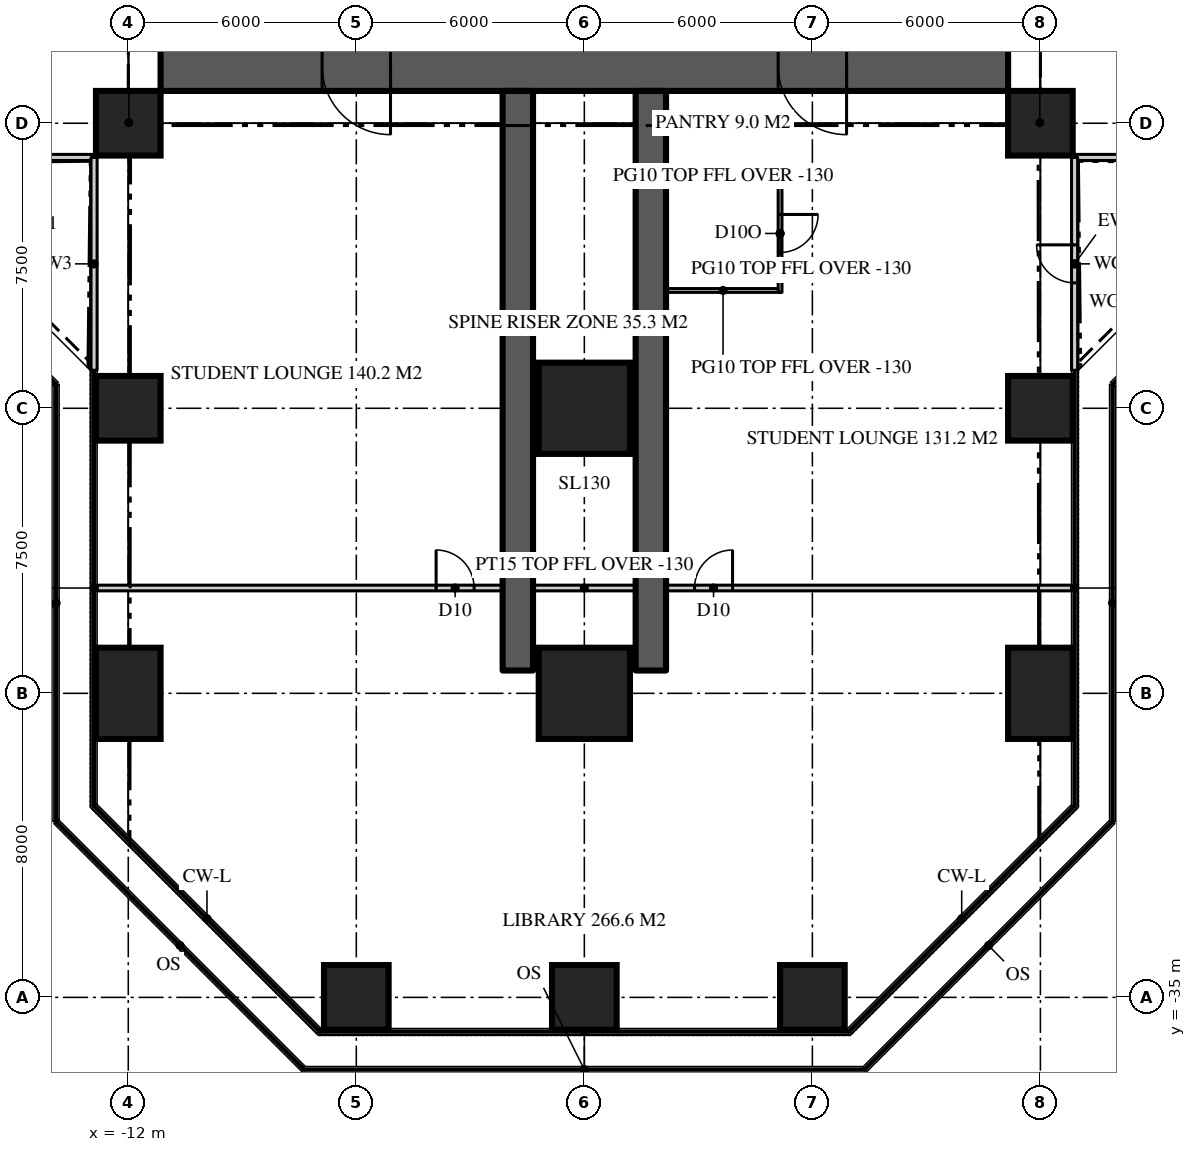
"""IFC4 building model, lengths in metres.
Left out: names, types, materials, properties, quantities, classifications, styles, units other than length and angle.
Written with IfcOpenShell. Run it as: python <this file> out.ifc"""

import sys

from ifc_helpers import new_model, si_unit, direction, frame, frame_2d, origin, origin_2d, place, context, subcontext, project, spatial, rectangle, extrude, element, fill, save


model = new_model("IFC4")
c1 = context("Model", 3, precision=1e-05, world=origin(), true_north=direction((0.0, 1.0)))
c2 = subcontext(c1, "Body", "Model", "MODEL_VIEW")
j1 = project(units=[si_unit("LENGTHUNIT", "METRE"), si_unit("PLANEANGLEUNIT", "RADIAN")], contexts=[c1])
p1 = place(None, origin())
s1 = spatial("IfcSite", under=j1, at=p1, CompositionType="ELEMENT")
p2 = place(p1, origin())
s2 = spatial("IfcBuilding", under=s1, at=p2, CompositionType="ELEMENT")
p3 = place(p2, frame((0.0, 0.0, 109.8)))
s3 = spatial("IfcBuildingStorey", under=s2, at=p3, CompositionType="ELEMENT", Elevation=109.8)
p4 = place(p3, frame((11.15, -10.5, 0.0), z_axis=(0.0, 0.0, 1.0), x_axis=(-1.0, 0.0, 0.0)))
e1 = element("IfcWall", 1, at=p4, inside=s3, PredefinedType="SHEAR", context=c2, shape_type="SweptSolid", body=[
    extrude(rectangle(XDim=22.3, YDim=1.3, at=frame_2d((11.15, 0.0))), origin(), (0.0, 0.0, 1.0), 3.9),
])
p5 = place(p4, frame((16.25, 0.0, 0.0)))
e2 = element("IfcOpeningElement", 2, at=p5, cuts=e1, PredefinedType="OPENING", context=c2, shape_type="SweptSolid", body=[
    extrude(rectangle(XDim=1.8, YDim=2.2, at=frame_2d((0.9, 1.1))), frame((0.0, 0.66, 0.0), z_axis=(0.0, -1.0, 0.0), x_axis=(1.0, 0.0, 0.0)), (0.0, 0.0, 1.0), 1.32),
])
p6 = place(p4, frame((4.25, 0.0, 0.0)))
e3 = element("IfcOpeningElement", 3, at=p6, cuts=e1, PredefinedType="OPENING", context=c2, shape_type="SweptSolid", body=[
    extrude(rectangle(XDim=1.8, YDim=2.2, at=frame_2d((0.9, 1.1))), frame((0.0, 0.66, 0.0), z_axis=(0.0, -1.0, 0.0), x_axis=(1.0, 0.0, 0.0)), (0.0, 0.0, 1.0), 1.32),
])
for number, where, z_axis, x_axis in (
    (4, (-1.75, -11.15, 0.0), (0.0, 0.0, 1.0), (0.0, -1.0, 0.0)),
    (5, (1.75, -11.15, 0.0), (0.0, 0.0, 1.0), (0.0, -1.0, 0.0)),
):
    element("IfcWall", number, at=place(p3, frame(where, z_axis=z_axis, x_axis=x_axis)), inside=s3, PredefinedType="SHEAR", context=c2, shape_type="SweptSolid", body=[
        extrude(rectangle(XDim=15.25, YDim=0.8, at=frame_2d((7.625, 0.0))), origin(), (0.0, 0.0, 1.0), 3.9),
    ])
for number, where, z_axis, x_axis in (
    (6, (-6.0, -35.0, 0.0), (0.0, 0.0, 1.0), (1.0, 0.0, 0.0)),
    (7, (0.0, -35.0, 0.0), (0.0, 0.0, 1.0), (1.0, 0.0, 0.0)),
    (8, (6.0, -35.0, 0.0), (0.0, 0.0, 1.0), (1.0, 0.0, 0.0)),
):
    element("IfcColumn", number, at=place(p3, frame(where, z_axis=z_axis, x_axis=x_axis)), inside=s3, PredefinedType="COLUMN", context=c2, shape_type="SweptSolid", body=[
        extrude(rectangle(XDim=1.7, YDim=1.7, at=origin_2d()), origin(), (0.0, 0.0, 1.0), 3.9),
    ])
p7 = place(p3, frame((-12.0, -27.0, 0.0), z_axis=(0.0, 0.0, 1.0), x_axis=(1.0, 0.0, 0.0)))
e9 = element("IfcColumn", 9, at=p7, inside=s3, PredefinedType="COLUMN", context=c2, shape_type="SweptSolid", body=[
    extrude(rectangle(XDim=1.7, YDim=2.4, at=origin_2d()), origin(), (0.0, 0.0, 1.0), 3.9),
])
p8 = place(p3, frame((0.0, -27.0, 0.0), z_axis=(0.0, 0.0, 1.0), x_axis=(1.0, 0.0, 0.0)))
e10 = element("IfcColumn", 10, at=p8, inside=s3, PredefinedType="COLUMN", context=c2, shape_type="SweptSolid", body=[
    extrude(rectangle(XDim=2.4, YDim=2.4, at=origin_2d()), origin(), (0.0, 0.0, 1.0), 3.9),
])
p9 = place(p3, frame((12.0, -27.0, 0.0), z_axis=(0.0, 0.0, 1.0), x_axis=(1.0, 0.0, 0.0)))
e11 = element("IfcColumn", 11, at=p9, inside=s3, PredefinedType="COLUMN", context=c2, shape_type="SweptSolid", body=[
    extrude(rectangle(XDim=1.7, YDim=2.4, at=origin_2d()), origin(), (0.0, 0.0, 1.0), 3.9),
])
p10 = place(p3, frame((-12.0, -19.5, 0.0), z_axis=(0.0, 0.0, 1.0), x_axis=(1.0, 0.0, 0.0)))
e12 = element("IfcColumn", 12, at=p10, inside=s3, PredefinedType="COLUMN", context=c2, shape_type="SweptSolid", body=[
    extrude(rectangle(XDim=1.7, YDim=1.7, at=origin_2d()), origin(), (0.0, 0.0, 1.0), 3.9),
])
p11 = place(p3, frame((0.0, -19.5, 0.0), z_axis=(0.0, 0.0, 1.0), x_axis=(1.0, 0.0, 0.0)))
e13 = element("IfcColumn", 13, at=p11, inside=s3, PredefinedType="COLUMN", context=c2, shape_type="SweptSolid", body=[
    extrude(rectangle(XDim=2.4, YDim=2.4, at=origin_2d()), origin(), (0.0, 0.0, 1.0), 3.9),
])
for number, where, z_axis, x_axis in (
    (14, (12.0, -19.5, 0.0), (0.0, 0.0, 1.0), (1.0, 0.0, 0.0)),
    (15, (-12.0, -12.0, 0.0), (0.0, 0.0, 1.0), (1.0, 0.0, 0.0)),
    (16, (12.0, -12.0, 0.0), (0.0, 0.0, 1.0), (1.0, 0.0, 0.0)),
):
    element("IfcColumn", number, at=place(p3, frame(where, z_axis=z_axis, x_axis=x_axis)), inside=s3, PredefinedType="COLUMN", context=c2, shape_type="SweptSolid", body=[
        extrude(rectangle(XDim=1.7, YDim=1.7, at=origin_2d()), origin(), (0.0, 0.0, 1.0), 3.9),
    ])
p12 = place(p3, frame((12.9, -12.9, 0.0), z_axis=(0.0, 0.0, 1.0), x_axis=(1.0, 0.0, 0.0)))
e17 = element("IfcWall", 17, at=p12, inside=s3, PredefinedType="SOLIDWALL", context=c2, shape_type="SweptSolid", body=[
    extrude(rectangle(XDim=5.6, YDim=0.16, at=frame_2d((2.8, 0.0))), origin(), (0.0, 0.0, 1.0), 3.77),
])
p13 = place(p3, frame((-18.5, -12.9, 0.0), z_axis=(0.0, 0.0, 1.0), x_axis=(1.0, 0.0, 0.0)))
e18 = element("IfcWall", 18, at=p13, inside=s3, PredefinedType="SOLIDWALL", context=c2, shape_type="SweptSolid", body=[
    extrude(rectangle(XDim=5.6, YDim=0.16, at=frame_2d((2.8, 0.0))), origin(), (0.0, 0.0, 1.0), 3.77),
])
p14 = place(p13, frame((2.3, 0.0, 0.0)))
e19 = element("IfcOpeningElement", 19, at=p14, cuts=e18, PredefinedType="OPENING", context=c2, shape_type="SweptSolid", body=[
    extrude(rectangle(XDim=1.0, YDim=2.2, at=frame_2d((0.5, 1.1))), frame((0.0, 0.09, 0.0), z_axis=(0.0, -1.0, 0.0), x_axis=(1.0, 0.0, 0.0)), (0.0, 0.0, 1.0), 0.18),
])
p15 = place(p3, frame((-12.9, -12.9, 0.0), z_axis=(0.0, 0.0, 1.0), x_axis=(0.0, -1.0, 0.0)))
e20 = element("IfcWall", 20, at=p15, inside=s3, PredefinedType="SOLIDWALL", context=c2, shape_type="SweptSolid", body=[
    extrude(rectangle(XDim=5.6, YDim=0.16, at=frame_2d((2.8, 0.0))), origin(), (0.0, 0.0, 1.0), 3.77),
])
p16 = place(p3, frame((12.9, -18.5, 0.0), z_axis=(0.0, 0.0, 1.0), x_axis=(0.0, 1.0, 0.0)))
e21 = element("IfcWall", 21, at=p16, inside=s3, PredefinedType="SOLIDWALL", context=c2, shape_type="SweptSolid", body=[
    extrude(rectangle(XDim=5.6, YDim=0.16, at=frame_2d((2.8, 0.0))), origin(), (0.0, 0.0, 1.0), 3.77),
])
p17 = place(p16, frame((2.3, 0.0, 0.0)))
e22 = element("IfcOpeningElement", 22, at=p17, cuts=e21, PredefinedType="OPENING", context=c2, shape_type="SweptSolid", body=[
    extrude(rectangle(XDim=1.0, YDim=2.2, at=frame_2d((0.5, 1.1))), frame((0.0, 0.09, 0.0), z_axis=(0.0, -1.0, 0.0), x_axis=(1.0, 0.0, 0.0)), (0.0, 0.0, 1.0), 0.18),
])
p18 = place(p3, frame((-12.82, -24.229, 0.0), z_axis=(0.0, 0.0, 1.0), x_axis=(1.0, 0.0, 0.0)))
e23 = element("IfcWall", 23, at=p18, inside=s3, PredefinedType="PARTITIONING", context=c2, shape_type="SweptSolid", body=[
    extrude(rectangle(XDim=25.64, YDim=0.15, at=frame_2d((12.82, 0.0))), origin(), (0.0, 0.0, 1.0), 3.77),
])
p19 = place(p18, frame((15.72, 0.0, 0.0)))
e24 = element("IfcOpeningElement", 24, at=p19, cuts=e23, PredefinedType="OPENING", context=c2, shape_type="SweptSolid", body=[
    extrude(rectangle(XDim=1.0, YDim=2.2, at=frame_2d((0.5, 1.1))), frame((0.0, 0.085, 0.0), z_axis=(0.0, -1.0, 0.0), x_axis=(1.0, 0.0, 0.0)), (0.0, 0.0, 1.0), 0.17),
])
p20 = place(p18, frame((8.92, 0.0, 0.0)))
e25 = element("IfcOpeningElement", 25, at=p20, cuts=e23, PredefinedType="OPENING", context=c2, shape_type="SweptSolid", body=[
    extrude(rectangle(XDim=1.0, YDim=2.2, at=frame_2d((0.5, 1.1))), frame((0.0, 0.085, 0.0), z_axis=(0.0, -1.0, 0.0), x_axis=(1.0, 0.0, 0.0)), (0.0, 0.0, 1.0), 0.17),
])
for number, where, z_axis, x_axis in (
    (26, (2.15, -13.4, 0.0), (0.0, 0.0, 1.0), (1.0, 0.0, 0.0)),
    (27, (2.15, -16.4, 0.0), (0.0, 0.0, 1.0), (1.0, 0.0, 0.0)),
):
    element("IfcWall", number, at=place(p3, frame(where, z_axis=z_axis, x_axis=x_axis)), inside=s3, PredefinedType="PARTITIONING", context=c2, shape_type="SweptSolid", body=[
        extrude(rectangle(XDim=3.0, YDim=0.1, at=frame_2d((1.5, 0.0))), origin(), (0.0, 0.0, 1.0), 3.77),
    ])
p21 = place(p3, frame((5.15, -13.35, 0.0), z_axis=(0.0, 0.0, 1.0), x_axis=(0.0, -1.0, 0.0)))
e28 = element("IfcWall", 28, at=p21, inside=s3, PredefinedType="PARTITIONING", context=c2, shape_type="SweptSolid", body=[
    extrude(rectangle(XDim=3.1, YDim=0.1, at=frame_2d((1.55, 0.0))), origin(), (0.0, 0.0, 1.0), 3.77),
])
p22 = place(p21, frame((1.05, 0.0, 0.0)))
e29 = element("IfcOpeningElement", 29, at=p22, cuts=e28, PredefinedType="OPENING", context=c2, shape_type="SweptSolid", body=[
    extrude(rectangle(XDim=1.0, YDim=2.2, at=frame_2d((0.5, 1.1))), frame((0.0, 0.06, 0.0), z_axis=(0.0, -1.0, 0.0), x_axis=(1.0, 0.0, 0.0)), (0.0, 0.0, 1.0), 0.12),
])
for number, where, z_axis, x_axis in (
    (30, (-11.15, -11.15, 0.0), (0.0, 0.0, 1.0), (-0.707, -0.707, 0.0)),
    (31, (11.15, -11.15, 0.0), (0.0, 0.0, 1.0), (0.707, -0.707, 0.0)),
):
    element("IfcWall", number, at=place(p3, frame(where, z_axis=z_axis, x_axis=x_axis)), inside=s3, PredefinedType="PARTITIONING", context=c2, shape_type="SweptSolid", body=[
        extrude(rectangle(XDim=2.362, YDim=0.15, at=frame_2d((1.181, 0.0))), origin(), (0.0, 0.0, 1.0), 3.77),
    ])
p23 = place(p17, origin())
e32 = element("IfcDoor", 32, at=p23, inside=s3, OperationType="SINGLE_SWING_RIGHT", PredefinedType="DOOR", context=c2, shape_type="SweptSolid", body=[
    extrude(rectangle(XDim=1.0, YDim=2.2, at=frame_2d((0.5, 1.1))), frame((0.0, 0.025, 0.0), z_axis=(0.0, -1.0, 0.0), x_axis=(1.0, 0.0, 0.0)), (0.0, 0.0, 1.0), 0.05),
])
fill(e22, e32)
p24 = place(p5, origin())
e33 = element("IfcDoor", 33, at=p24, inside=s3, OperationType="DOUBLE_DOOR_DOUBLE_SWING", PredefinedType="DOOR", context=c2, shape_type="SweptSolid", body=[
    extrude(rectangle(XDim=1.8, YDim=2.2, at=frame_2d((0.9, 1.1))), frame((0.0, 0.025, 0.0), z_axis=(0.0, -1.0, 0.0), x_axis=(1.0, 0.0, 0.0)), (0.0, 0.0, 1.0), 0.05),
])
fill(e2, e33)
p25 = place(p6, origin())
e34 = element("IfcDoor", 34, at=p25, inside=s3, OperationType="DOUBLE_DOOR_DOUBLE_SWING", PredefinedType="DOOR", context=c2, shape_type="SweptSolid", body=[
    extrude(rectangle(XDim=1.8, YDim=2.2, at=frame_2d((0.9, 1.1))), frame((0.0, 0.025, 0.0), z_axis=(0.0, -1.0, 0.0), x_axis=(1.0, 0.0, 0.0)), (0.0, 0.0, 1.0), 0.05),
])
fill(e3, e34)
p26 = place(p19, origin())
e35 = element("IfcDoor", 35, at=p26, inside=s3, OperationType="SINGLE_SWING_RIGHT", PredefinedType="DOOR", context=c2, shape_type="SweptSolid", body=[
    extrude(rectangle(XDim=1.0, YDim=2.2, at=frame_2d((0.5, 1.1))), frame((0.0, 0.025, 0.0), z_axis=(0.0, -1.0, 0.0), x_axis=(1.0, 0.0, 0.0)), (0.0, 0.0, 1.0), 0.05),
])
fill(e24, e35)
p27 = place(p20, origin())
e36 = element("IfcDoor", 36, at=p27, inside=s3, OperationType="SINGLE_SWING_LEFT", PredefinedType="DOOR", context=c2, shape_type="SweptSolid", body=[
    extrude(rectangle(XDim=1.0, YDim=2.2, at=frame_2d((0.5, 1.1))), frame((0.0, 0.025, 0.0), z_axis=(0.0, -1.0, 0.0), x_axis=(1.0, 0.0, 0.0)), (0.0, 0.0, 1.0), 0.05),
])
fill(e25, e36)
p28 = place(p22, origin())
e37 = element("IfcDoor", 37, at=p28, inside=s3, OperationType="SINGLE_SWING_LEFT", PredefinedType="DOOR", context=c2, shape_type="SweptSolid", body=[
    extrude(rectangle(XDim=1.0, YDim=2.2, at=frame_2d((0.5, 1.1))), frame((0.0, 0.025, 0.0), z_axis=(0.0, -1.0, 0.0), x_axis=(1.0, 0.0, 0.0)), (0.0, 0.0, 1.0), 0.05),
])
fill(e29, e37)
save(model, sys.argv[1])
